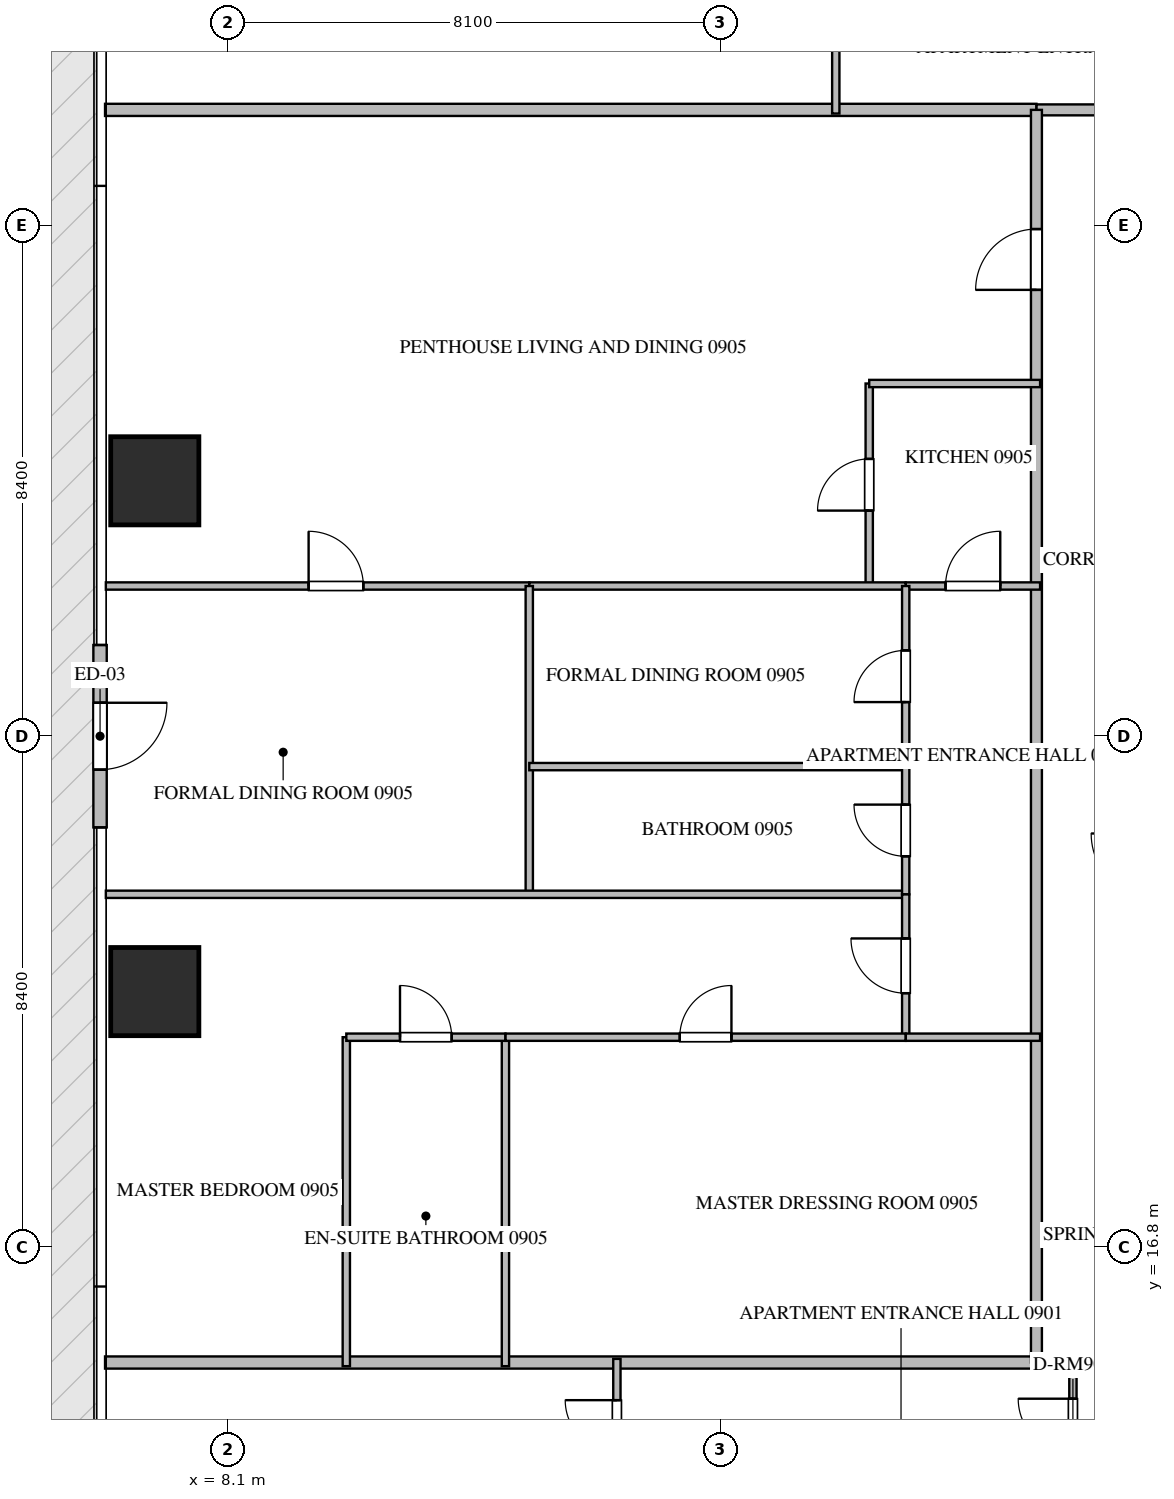
"""IFC4 building model, lengths in metres.
Left out: names, types, materials, properties, quantities, classifications, styles, units other than length and angle.
Written with IfcOpenShell. Run it as: python <this file> out.ifc"""

import sys

from ifc_helpers import new_model, si_unit, direction, frame, frame_2d, origin, origin_2d, place, context, subcontext, project, spatial, rectangle, extrude, source, transform, mapped, element, fill, save


model = new_model("IFC4")
c1 = context("Model", 3, precision=1e-05, world=origin(), true_north=direction((0.0, 1.0)))
c2 = subcontext(c1, "Body", "Model", "MODEL_VIEW")
j1 = project(units=[si_unit("LENGTHUNIT", "METRE"), si_unit("PLANEANGLEUNIT", "RADIAN")], contexts=[c1])
p1 = place(None, origin())
s1 = spatial("IfcSite", under=j1, at=p1, CompositionType="ELEMENT")
p2 = place(p1, origin())
s2 = spatial("IfcBuilding", under=s1, at=p2, CompositionType="ELEMENT")
p3 = place(p2, frame((0.0, 0.0, 41.7)))
s3 = spatial("IfcBuildingStorey", under=s2, at=p3, CompositionType="ELEMENT", Elevation=41.7)
m1 = source(origin(), c2, "Body", "SweptSolid", [
    extrude(rectangle(XDim=1.45, YDim=1.45, at=origin_2d()), origin(), (0.0, 0.0, 1.0), 3.75),
])
for number, where, z_axis, x_axis in (
    (1, (6.9, 21.0, -0.26), (0.0, 0.0, 1.0), (1.0, 0.0, 0.0)),
    (2, (6.9, 29.4, -0.26), (0.0, 0.0, 1.0), (1.0, 0.0, 0.0)),
):
    element("IfcColumn", number, at=place(p3, frame(where, z_axis=z_axis, x_axis=x_axis)), inside=s3, PredefinedType="COLUMN", context=c2, shape_type="MappedRepresentation", body=[
        mapped(m1, transform((0.0, 0.0, 0.0), scale=1.0)),
    ])
p4 = place(p3, frame((6.0, 26.7, 0.0), z_axis=(0.0, 0.0, 1.0), x_axis=(0.0, -1.0, 0.0)))
e3 = element("IfcWall", 3, at=p4, inside=s3, PredefinedType="ELEMENTEDWALL", context=c2, shape_type="SweptSolid", body=[
    extrude(rectangle(XDim=3.0, YDim=0.22, at=frame_2d((1.5, 0.0))), origin(), (0.0, 0.0, 1.0), 3.475),
])
p5 = place(p4, frame((0.95, 0.0, 0.0)))
e4 = element("IfcOpeningElement", 4, at=p5, cuts=e3, PredefinedType="OPENING", context=c2, shape_type="SweptSolid", body=[
    extrude(rectangle(XDim=1.1, YDim=2.2, at=frame_2d((0.55, 1.1))), frame((0.0, 0.12, 0.0), z_axis=(0.0, -1.0, 0.0), x_axis=(1.0, 0.0, 0.0)), (0.0, 0.0, 1.0), 0.24),
])
for number, where, z_axis, x_axis in (
    (5, (6.082, 14.9, 0.0), (0.0, 0.0, 1.0), (1.0, 0.0, 0.0)),
    (6, (6.082, 35.5, 0.0), (0.0, 0.0, 1.0), (1.0, 0.0, 0.0)),
):
    element("IfcWall", number, at=place(p3, frame(where, z_axis=z_axis, x_axis=x_axis)), inside=s3, PredefinedType="PARTITIONING", context=c2, shape_type="SweptSolid", body=[
        extrude(rectangle(XDim=15.318, YDim=0.2, at=frame_2d((7.659, 0.0))), origin(), (0.0, 0.0, 1.0), 3.49),
    ])
p6 = place(p3, frame((21.402, 14.9, 0.0), z_axis=(0.0, 0.0, 1.0), x_axis=(1.0, 0.0, 0.0)))
e7 = element("IfcWall", 7, at=p6, inside=s3, PredefinedType="PARTITIONING", context=c2, shape_type="SweptSolid", body=[
    extrude(rectangle(XDim=21.996, YDim=0.18, at=frame_2d((10.998, 0.0))), origin(), (0.0, 0.0, 1.0), 3.49),
])
p7 = place(p6, frame((5.816, 0.0, 0.0)))
e8 = element("IfcOpeningElement", 8, at=p7, cuts=e7, PredefinedType="OPENING", context=c2, shape_type="SweptSolid", body=[
    extrude(rectangle(XDim=1.0, YDim=2.15, at=frame_2d((0.5, 1.075))), frame((0.0, 0.1, 0.0), z_axis=(0.0, -1.0, 0.0), x_axis=(1.0, 0.0, 0.0)), (0.0, 0.0, 1.0), 0.2),
])
p8 = place(p6, frame((11.044, 0.0, 0.0)))
e9 = element("IfcOpeningElement", 9, at=p8, cuts=e7, PredefinedType="OPENING", context=c2, shape_type="SweptSolid", body=[
    extrude(rectangle(XDim=1.0, YDim=2.15, at=frame_2d((0.5, 1.075))), frame((0.0, 0.1, 0.0), z_axis=(0.0, -1.0, 0.0), x_axis=(1.0, 0.0, 0.0)), (0.0, 0.0, 1.0), 0.2),
])
p9 = place(p3, frame((21.402, 35.5, 0.0), z_axis=(0.0, 0.0, 1.0), x_axis=(1.0, 0.0, 0.0)))
e10 = element("IfcWall", 10, at=p9, inside=s3, PredefinedType="PARTITIONING", context=c2, shape_type="SweptSolid", body=[
    extrude(rectangle(XDim=21.996, YDim=0.18, at=frame_2d((10.998, 0.0))), origin(), (0.0, 0.0, 1.0), 3.49),
])
p10 = place(p9, frame((9.952, 0.0, 0.0)))
e11 = element("IfcOpeningElement", 11, at=p10, cuts=e10, PredefinedType="OPENING", context=c2, shape_type="SweptSolid", body=[
    extrude(rectangle(XDim=1.0, YDim=2.15, at=frame_2d((0.5, 1.075))), frame((0.0, 0.1, 0.0), z_axis=(0.0, -1.0, 0.0), x_axis=(1.0, 0.0, 0.0)), (0.0, 0.0, 1.0), 0.2),
])
p11 = place(p9, frame((15.18, 0.0, 0.0)))
e12 = element("IfcOpeningElement", 12, at=p11, cuts=e10, PredefinedType="OPENING", context=c2, shape_type="SweptSolid", body=[
    extrude(rectangle(XDim=1.0, YDim=2.15, at=frame_2d((0.5, 1.075))), frame((0.0, 0.1, 0.0), z_axis=(0.0, -1.0, 0.0), x_axis=(1.0, 0.0, 0.0)), (0.0, 0.0, 1.0), 0.2),
])
p12 = place(p3, frame((21.4, 14.9, 0.0), z_axis=(0.0, 0.0, 1.0), x_axis=(0.0, 1.0, 0.0)))
e13 = element("IfcWall", 13, at=p12, inside=s3, PredefinedType="PARTITIONING", context=c2, shape_type="SweptSolid", body=[
    extrude(rectangle(XDim=20.6, YDim=0.18, at=frame_2d((10.3, 0.0))), origin(), (0.0, 0.0, 1.0), 3.49),
])
p13 = place(p12, frame((17.64, 0.0, 0.0)))
e14 = element("IfcOpeningElement", 14, at=p13, cuts=e13, PredefinedType="OPENING", context=c2, shape_type="SweptSolid", body=[
    extrude(rectangle(XDim=1.0, YDim=2.15, at=frame_2d((0.5, 1.075))), frame((0.0, 0.1, 0.0), z_axis=(0.0, -1.0, 0.0), x_axis=(1.0, 0.0, 0.0)), (0.0, 0.0, 1.0), 0.2),
])
p14 = place(p3, frame((22.0, 12.75, 0.0), z_axis=(0.0, 0.0, 1.0), x_axis=(0.0, 1.0, 0.0)))
e15 = element("IfcWall", 15, at=p14, inside=s3, PredefinedType="PARTITIONING", context=c2, shape_type="SweptSolid", body=[
    extrude(rectangle(XDim=2.21, YDim=0.12, at=frame_2d((1.105, 0.0))), origin(), (0.0, 0.0, 1.0), 3.49),
])
p15 = place(p14, frame((0.655, 0.0, 0.0)))
e16 = element("IfcOpeningElement", 16, at=p15, cuts=e15, PredefinedType="OPENING", context=c2, shape_type="SweptSolid", body=[
    extrude(rectangle(XDim=0.9, YDim=2.1, at=frame_2d((0.45, 1.05))), frame((0.0, 0.07, 0.0), z_axis=(0.0, -1.0, 0.0), x_axis=(1.0, 0.0, 0.0)), (0.0, 0.0, 1.0), 0.14),
])
p16 = place(p3, frame((14.5, 12.752, 0.0), z_axis=(0.0, 0.0, 1.0), x_axis=(0.0, 1.0, 0.0)))
e17 = element("IfcWall", 17, at=p16, inside=s3, PredefinedType="PARTITIONING", context=c2, shape_type="SweptSolid", body=[
    extrude(rectangle(XDim=2.208, YDim=0.12, at=frame_2d((1.104, 0.0))), origin(), (0.0, 0.0, 1.0), 3.49),
])
p17 = place(p16, frame((0.679, 0.0, 0.0)))
e18 = element("IfcOpeningElement", 18, at=p17, cuts=e17, PredefinedType="OPENING", context=c2, shape_type="SweptSolid", body=[
    extrude(rectangle(XDim=0.85, YDim=2.1, at=frame_2d((0.425, 1.05))), frame((0.0, 0.07, 0.0), z_axis=(0.0, -1.0, 0.0), x_axis=(1.0, 0.0, 0.0)), (0.0, 0.0, 1.0), 0.14),
])
p18 = place(p3, frame((18.1, 37.648, 0.0), z_axis=(0.0, 0.0, 1.0), x_axis=(0.0, -1.0, 0.0)))
e19 = element("IfcWall", 19, at=p18, inside=s3, PredefinedType="PARTITIONING", context=c2, shape_type="SweptSolid", body=[
    extrude(rectangle(XDim=2.208, YDim=0.12, at=frame_2d((1.104, 0.0))), origin(), (0.0, 0.0, 1.0), 3.49),
])
p19 = place(p3, frame((18.65, 27.67, 0.0), z_axis=(0.0, 0.0, 1.0), x_axis=(0.0, 1.0, 0.0)))
e20 = element("IfcWall", 20, at=p19, inside=s3, PredefinedType="PARTITIONING", context=c2, shape_type="SweptSolid", body=[
    extrude(rectangle(XDim=3.33, YDim=0.12, at=frame_2d((1.665, 0.0))), origin(), (0.0, 0.0, 1.0), 3.49),
])
p20 = place(p19, frame((1.24, 0.0, 0.0)))
e21 = element("IfcOpeningElement", 21, at=p20, cuts=e20, PredefinedType="OPENING", context=c2, shape_type="SweptSolid", body=[
    extrude(rectangle(XDim=0.85, YDim=2.1, at=frame_2d((0.425, 1.05))), frame((0.0, 0.07, 0.0), z_axis=(0.0, -1.0, 0.0), x_axis=(1.0, 0.0, 0.0)), (0.0, 0.0, 1.0), 0.14),
])
p21 = place(p3, frame((18.65, 31.0, 0.0), z_axis=(0.0, 0.0, 1.0), x_axis=(1.0, 0.0, 0.0)))
e22 = element("IfcWall", 22, at=p21, inside=s3, PredefinedType="PARTITIONING", context=c2, shape_type="SweptSolid", body=[
    extrude(rectangle(XDim=2.81, YDim=0.12, at=frame_2d((1.405, 0.0))), origin(), (0.0, 0.0, 1.0), 3.49),
])
p22 = place(p3, frame((19.25, 27.67, 0.0), z_axis=(0.0, 0.0, 1.0), x_axis=(1.0, 0.0, 0.0)))
e23 = element("IfcWall", 23, at=p22, inside=s3, PredefinedType="PARTITIONING", context=c2, shape_type="SweptSolid", body=[
    extrude(rectangle(XDim=2.21, YDim=0.12, at=frame_2d((1.105, 0.0))), origin(), (0.0, 0.0, 1.0), 3.49),
])
p23 = place(p22, frame((0.655, 0.0, 0.0)))
e24 = element("IfcOpeningElement", 24, at=p23, cuts=e23, PredefinedType="OPENING", context=c2, shape_type="SweptSolid", body=[
    extrude(rectangle(XDim=0.9, YDim=2.1, at=frame_2d((0.45, 1.05))), frame((0.0, 0.07, 0.0), z_axis=(0.0, -1.0, 0.0), x_axis=(1.0, 0.0, 0.0)), (0.0, 0.0, 1.0), 0.14),
])
p24 = place(p3, frame((6.095, 27.67, 0.0), z_axis=(0.0, 0.0, 1.0), x_axis=(1.0, 0.0, 0.0)))
e25 = element("IfcWall", 25, at=p24, inside=s3, PredefinedType="PARTITIONING", context=c2, shape_type="SweptSolid", body=[
    extrude(rectangle(XDim=6.964, YDim=0.12, at=frame_2d((3.482, 0.0))), origin(), (0.0, 0.0, 1.0), 3.49),
])
p25 = place(p24, frame((3.335, 0.0, 0.0)))
e26 = element("IfcOpeningElement", 26, at=p25, cuts=e25, PredefinedType="OPENING", context=c2, shape_type="SweptSolid", body=[
    extrude(rectangle(XDim=0.9, YDim=2.1, at=frame_2d((0.45, 1.05))), frame((0.0, 0.07, 0.0), z_axis=(0.0, -1.0, 0.0), x_axis=(1.0, 0.0, 0.0)), (0.0, 0.0, 1.0), 0.14),
])
p26 = place(p3, frame((13.061, 27.67, 0.0), z_axis=(0.0, 0.0, 1.0), x_axis=(1.0, 0.0, 0.0)))
e27 = element("IfcWall", 27, at=p26, inside=s3, PredefinedType="PARTITIONING", context=c2, shape_type="SweptSolid", body=[
    extrude(rectangle(XDim=6.187, YDim=0.12, at=frame_2d((3.094, 0.0))), origin(), (0.0, 0.0, 1.0), 3.49),
])
p27 = place(p3, frame((13.059, 22.6, 0.0), z_axis=(0.0, 0.0, 1.0), x_axis=(0.0, 1.0, 0.0)))
e28 = element("IfcWall", 28, at=p27, inside=s3, PredefinedType="PARTITIONING", context=c2, shape_type="SweptSolid", body=[
    extrude(rectangle(XDim=5.07, YDim=0.12, at=frame_2d((2.535, 0.0))), origin(), (0.0, 0.0, 1.0), 3.49),
])
p28 = place(p3, frame((6.095, 22.6, 0.0), z_axis=(0.0, 0.0, 1.0), x_axis=(1.0, 0.0, 0.0)))
e29 = element("IfcWall", 29, at=p28, inside=s3, PredefinedType="PARTITIONING", context=c2, shape_type="SweptSolid", body=[
    extrude(rectangle(XDim=13.155, YDim=0.12, at=frame_2d((6.578, 0.0))), origin(), (0.0, 0.0, 1.0), 3.49),
])
p29 = place(p3, frame((13.059, 24.7, 0.0), z_axis=(0.0, 0.0, 1.0), x_axis=(1.0, 0.0, 0.0)))
e30 = element("IfcWall", 30, at=p29, inside=s3, PredefinedType="PARTITIONING", context=c2, shape_type="SweptSolid", body=[
    extrude(rectangle(XDim=6.191, YDim=0.12, at=frame_2d((3.095, 0.0))), origin(), (0.0, 0.0, 1.0), 3.49),
])
p30 = place(p3, frame((19.25, 22.6, 0.0), z_axis=(0.0, 0.0, 1.0), x_axis=(0.0, 1.0, 0.0)))
e31 = element("IfcWall", 31, at=p30, inside=s3, PredefinedType="PARTITIONING", context=c2, shape_type="SweptSolid", body=[
    extrude(rectangle(XDim=2.1, YDim=0.12, at=frame_2d((1.05, 0.0))), origin(), (0.0, 0.0, 1.0), 3.49),
])
p31 = place(p30, frame((0.625, 0.0, 0.0)))
e32 = element("IfcOpeningElement", 32, at=p31, cuts=e31, PredefinedType="OPENING", context=c2, shape_type="SweptSolid", body=[
    extrude(rectangle(XDim=0.85, YDim=2.1, at=frame_2d((0.425, 1.05))), frame((0.0, 0.07, 0.0), z_axis=(0.0, -1.0, 0.0), x_axis=(1.0, 0.0, 0.0)), (0.0, 0.0, 1.0), 0.14),
])
p32 = place(p3, frame((19.25, 24.702, 0.0), z_axis=(0.0, 0.0, 1.0), x_axis=(0.0, 1.0, 0.0)))
e33 = element("IfcWall", 33, at=p32, inside=s3, PredefinedType="PARTITIONING", context=c2, shape_type="SweptSolid", body=[
    extrude(rectangle(XDim=2.968, YDim=0.12, at=frame_2d((1.484, 0.0))), origin(), (0.0, 0.0, 1.0), 3.49),
])
p33 = place(p32, frame((1.059, 0.0, 0.0)))
e34 = element("IfcOpeningElement", 34, at=p33, cuts=e33, PredefinedType="OPENING", context=c2, shape_type="SweptSolid", body=[
    extrude(rectangle(XDim=0.85, YDim=2.1, at=frame_2d((0.425, 1.05))), frame((0.0, 0.07, 0.0), z_axis=(0.0, -1.0, 0.0), x_axis=(1.0, 0.0, 0.0)), (0.0, 0.0, 1.0), 0.14),
])
p34 = place(p3, frame((19.25, 20.25, 0.0), z_axis=(0.0, 0.0, 1.0), x_axis=(0.0, 1.0, 0.0)))
e35 = element("IfcWall", 35, at=p34, inside=s3, PredefinedType="PARTITIONING", context=c2, shape_type="SweptSolid", body=[
    extrude(rectangle(XDim=2.348, YDim=0.12, at=frame_2d((1.174, 0.0))), origin(), (0.0, 0.0, 1.0), 3.49),
])
p35 = place(p34, frame((0.724, 0.0, 0.0)))
e36 = element("IfcOpeningElement", 36, at=p35, cuts=e35, PredefinedType="OPENING", context=c2, shape_type="SweptSolid", body=[
    extrude(rectangle(XDim=0.9, YDim=2.1, at=frame_2d((0.45, 1.05))), frame((0.0, 0.07, 0.0), z_axis=(0.0, -1.0, 0.0), x_axis=(1.0, 0.0, 0.0)), (0.0, 0.0, 1.0), 0.14),
])
for number, where, z_axis, x_axis in (
    (37, (10.05, 14.84, 0.0), (0.0, 0.0, 1.0), (0.0, 1.0, 0.0)),
    (38, (12.667, 14.84, 0.0), (0.0, 0.0, 1.0), (0.0, 1.0, 0.0)),
):
    element("IfcWall", number, at=place(p3, frame(where, z_axis=z_axis, x_axis=x_axis)), inside=s3, PredefinedType="PARTITIONING", context=c2, shape_type="SweptSolid", body=[
        extrude(rectangle(XDim=5.41, YDim=0.12, at=frame_2d((2.705, 0.0))), origin(), (0.0, 0.0, 1.0), 3.49),
    ])
p36 = place(p3, frame((10.05, 20.25, 0.0), z_axis=(0.0, 0.0, 1.0), x_axis=(1.0, 0.0, 0.0)))
e39 = element("IfcWall", 39, at=p36, inside=s3, PredefinedType="PARTITIONING", context=c2, shape_type="SweptSolid", body=[
    extrude(rectangle(XDim=2.617, YDim=0.12, at=frame_2d((1.309, 0.0))), origin(), (0.0, 0.0, 1.0), 3.49),
])
p37 = place(p36, frame((0.883, 0.0, 0.0)))
e40 = element("IfcOpeningElement", 40, at=p37, cuts=e39, PredefinedType="OPENING", context=c2, shape_type="SweptSolid", body=[
    extrude(rectangle(XDim=0.85, YDim=2.1, at=frame_2d((0.425, 1.05))), frame((0.0, 0.07, 0.0), z_axis=(0.0, -1.0, 0.0), x_axis=(1.0, 0.0, 0.0)), (0.0, 0.0, 1.0), 0.14),
])
p38 = place(p3, frame((12.669, 20.25, 0.0), z_axis=(0.0, 0.0, 1.0), x_axis=(1.0, 0.0, 0.0)))
e41 = element("IfcWall", 41, at=p38, inside=s3, PredefinedType="PARTITIONING", context=c2, shape_type="SweptSolid", body=[
    extrude(rectangle(XDim=6.581, YDim=0.12, at=frame_2d((3.291, 0.0))), origin(), (0.0, 0.0, 1.0), 3.49),
])
p39 = place(p38, frame((2.865, 0.0, 0.0)))
e42 = element("IfcOpeningElement", 42, at=p39, cuts=e41, PredefinedType="OPENING", context=c2, shape_type="SweptSolid", body=[
    extrude(rectangle(XDim=0.85, YDim=2.1, at=frame_2d((0.425, 1.05))), frame((0.0, 0.07, 0.0), z_axis=(0.0, -1.0, 0.0), x_axis=(1.0, 0.0, 0.0)), (0.0, 0.0, 1.0), 0.14),
])
p40 = place(p3, frame((19.252, 20.25, 0.0), z_axis=(0.0, 0.0, 1.0), x_axis=(1.0, 0.0, 0.0)))
e43 = element("IfcWall", 43, at=p40, inside=s3, PredefinedType="PARTITIONING", context=c2, shape_type="SweptSolid", body=[
    extrude(rectangle(XDim=2.208, YDim=0.12, at=frame_2d((1.104, 0.0))), origin(), (0.0, 0.0, 1.0), 3.49),
])
m2 = source(origin(), c2, "Body", "SweptSolid", [
    extrude(rectangle(XDim=1.1, YDim=2.2, at=frame_2d((0.55, 1.1))), frame((0.0, 0.025, 0.0), z_axis=(0.0, -1.0, 0.0), x_axis=(1.0, 0.0, 0.0)), (0.0, 0.0, 1.0), 0.05),
])
p41 = place(p5, origin())
e44 = element("IfcDoor", 44, at=p41, inside=s3, OperationType="SINGLE_SWING_LEFT", PredefinedType="DOOR", context=c2, shape_type="MappedRepresentation", body=[
    mapped(m2, transform((0.0, 0.0, 0.0), scale=1.0)),
])
fill(e4, e44)
m3 = source(origin(), c2, "Body", "SweptSolid", [
    extrude(rectangle(XDim=1.0, YDim=2.15, at=frame_2d((0.5, 1.075))), frame((0.0, 0.025, 0.0), z_axis=(0.0, -1.0, 0.0), x_axis=(1.0, 0.0, 0.0)), (0.0, 0.0, 1.0), 0.05),
])
p42 = place(p13, origin())
e45 = element("IfcDoor", 45, at=p42, inside=s3, OperationType="SINGLE_SWING_LEFT", PredefinedType="DOOR", context=c2, shape_type="MappedRepresentation", body=[
    mapped(m3, transform((0.0, 0.0, 0.0), scale=1.0)),
])
fill(e14, e45)
m4 = source(origin(), c2, "Body", "SweptSolid", [
    extrude(rectangle(XDim=0.9, YDim=2.1, at=frame_2d((0.45, 1.05))), frame((0.0, 0.025, 0.0), z_axis=(0.0, -1.0, 0.0), x_axis=(1.0, 0.0, 0.0)), (0.0, 0.0, 1.0), 0.05),
])
p43 = place(p15, origin())
e46 = element("IfcDoor", 46, at=p43, inside=s3, OperationType="SINGLE_SWING_RIGHT", PredefinedType="DOOR", context=c2, shape_type="MappedRepresentation", body=[
    mapped(m4, transform((0.0, 0.0, 0.0), scale=1.0)),
])
fill(e16, e46)
m5 = source(origin(), c2, "Body", "SweptSolid", [
    extrude(rectangle(XDim=0.85, YDim=2.1, at=frame_2d((0.425, 1.05))), frame((0.0, 0.025, 0.0), z_axis=(0.0, -1.0, 0.0), x_axis=(1.0, 0.0, 0.0)), (0.0, 0.0, 1.0), 0.05),
])
p44 = place(p17, origin())
e47 = element("IfcDoor", 47, at=p44, inside=s3, OperationType="SINGLE_SWING_RIGHT", PredefinedType="DOOR", context=c2, shape_type="MappedRepresentation", body=[
    mapped(m5, transform((0.0, 0.0, 0.0), scale=1.0)),
])
fill(e18, e47)
p45 = place(p20, origin())
e48 = element("IfcDoor", 48, at=p45, inside=s3, OperationType="SINGLE_SWING_LEFT", PredefinedType="DOOR", context=c2, shape_type="MappedRepresentation", body=[
    mapped(m5, transform((0.0, 0.0, 0.0), scale=1.0)),
])
fill(e21, e48)
p46 = place(p23, origin())
e49 = element("IfcDoor", 49, at=p46, inside=s3, OperationType="SINGLE_SWING_RIGHT", PredefinedType="DOOR", context=c2, shape_type="MappedRepresentation", body=[
    mapped(m4, transform((0.0, 0.0, 0.0), scale=1.0)),
])
fill(e24, e49)
p47 = place(p25, origin())
e50 = element("IfcDoor", 50, at=p47, inside=s3, OperationType="SINGLE_SWING_LEFT", PredefinedType="DOOR", context=c2, shape_type="MappedRepresentation", body=[
    mapped(m4, transform((0.0, 0.0, 0.0), scale=1.0)),
])
fill(e26, e50)
p48 = place(p31, origin())
e51 = element("IfcDoor", 51, at=p48, inside=s3, OperationType="SINGLE_SWING_RIGHT", PredefinedType="DOOR", context=c2, shape_type="MappedRepresentation", body=[
    mapped(m5, transform((0.0, 0.0, 0.0), scale=1.0)),
])
fill(e32, e51)
p49 = place(p33, origin())
e52 = element("IfcDoor", 52, at=p49, inside=s3, OperationType="SINGLE_SWING_LEFT", PredefinedType="DOOR", context=c2, shape_type="MappedRepresentation", body=[
    mapped(m5, transform((0.0, 0.0, 0.0), scale=1.0)),
])
fill(e34, e52)
p50 = place(p35, origin())
e53 = element("IfcDoor", 53, at=p50, inside=s3, OperationType="SINGLE_SWING_RIGHT", PredefinedType="DOOR", context=c2, shape_type="MappedRepresentation", body=[
    mapped(m4, transform((0.0, 0.0, 0.0), scale=1.0)),
])
fill(e36, e53)
p51 = place(p37, origin())
e54 = element("IfcDoor", 54, at=p51, inside=s3, OperationType="SINGLE_SWING_LEFT", PredefinedType="DOOR", context=c2, shape_type="MappedRepresentation", body=[
    mapped(m5, transform((0.0, 0.0, 0.0), scale=1.0)),
])
fill(e40, e54)
p52 = place(p39, origin())
e55 = element("IfcDoor", 55, at=p52, inside=s3, OperationType="SINGLE_SWING_RIGHT", PredefinedType="DOOR", context=c2, shape_type="MappedRepresentation", body=[
    mapped(m5, transform((0.0, 0.0, 0.0), scale=1.0)),
])
fill(e42, e55)
save(model, sys.argv[1])
